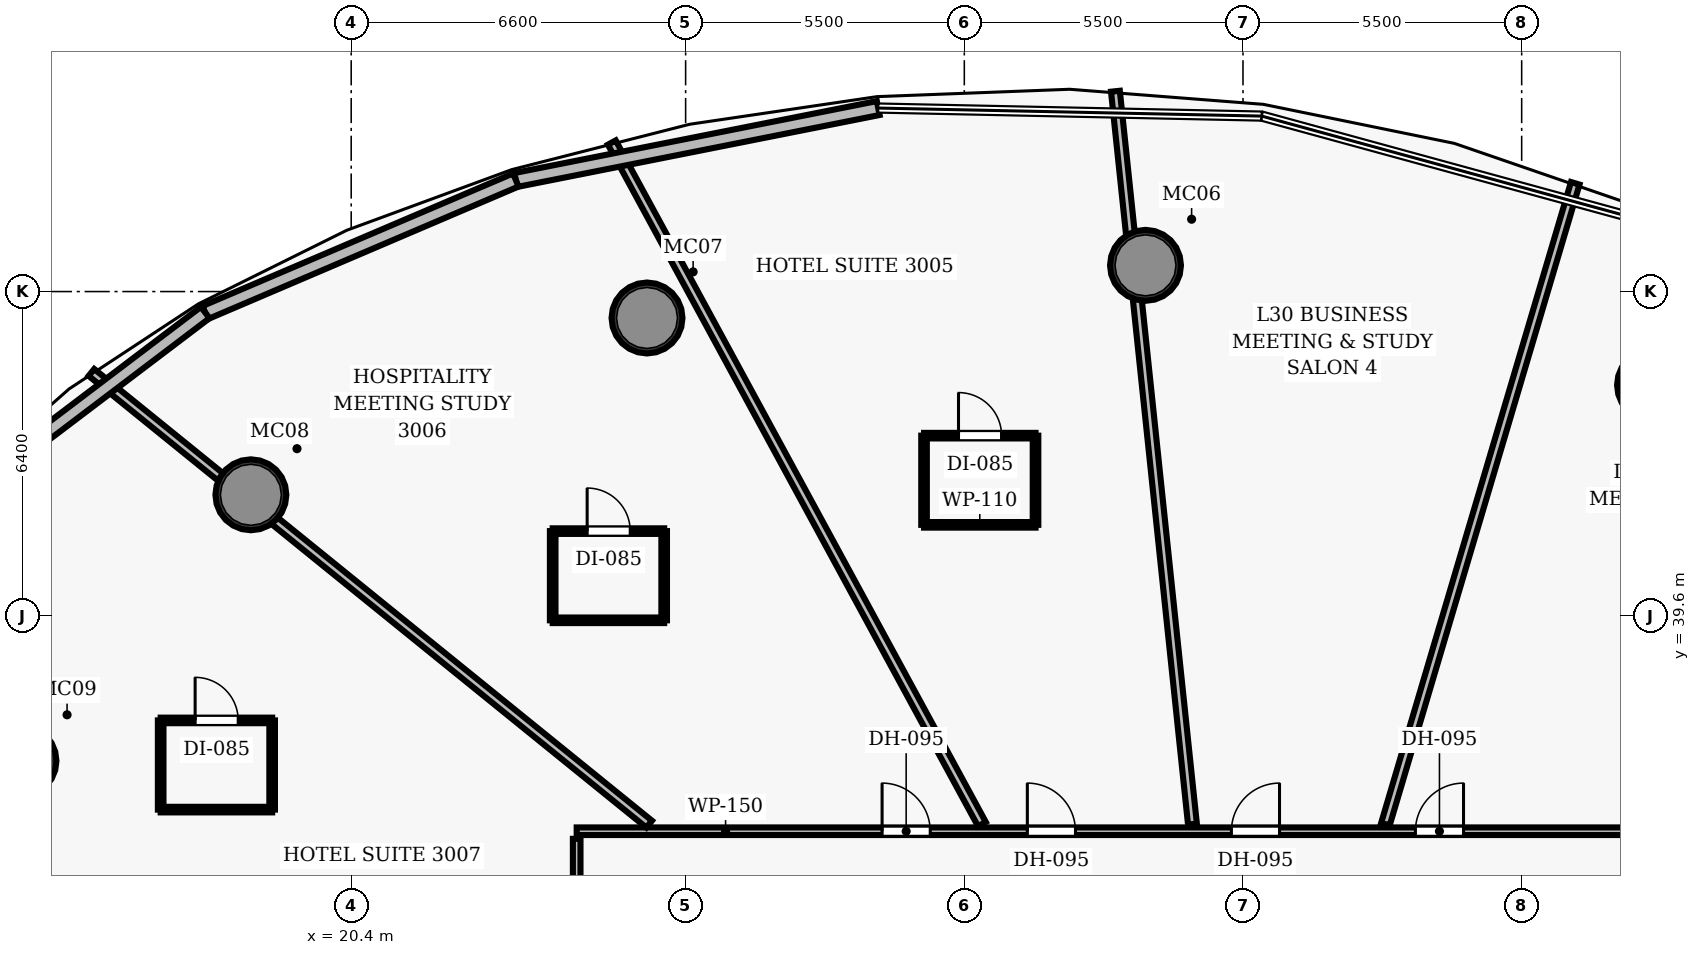
"""IFC4 building model, lengths in metres.
Left out: names, types, materials, properties, quantities, classifications, styles, units other than length and angle.
Written with IfcOpenShell. Run it as: python <this file> out.ifc"""

import sys

from ifc_helpers import new_model, si_unit, direction, frame, frame_2d, origin, origin_2d, place, context, subcontext, project, spatial, rectangle, hollow_circle, extrude, element, fill, save


model = new_model("IFC4")
c1 = context("Model", 3, precision=1e-05, world=origin(), true_north=direction((0.0, 1.0)))
c2 = subcontext(c1, "Body", "Model", "MODEL_VIEW")
j1 = project(units=[si_unit("LENGTHUNIT", "METRE"), si_unit("PLANEANGLEUNIT", "RADIAN")], contexts=[c1])
p1 = place(None, origin())
s1 = spatial("IfcSite", under=j1, at=p1, CompositionType="ELEMENT")
p2 = place(p1, origin())
s2 = spatial("IfcBuilding", under=s1, at=p2, CompositionType="ELEMENT")
p3 = place(p2, frame((0.0, 0.0, 123.8)))
s3 = spatial("IfcBuildingStorey", under=s2, at=p3, CompositionType="ELEMENT", Elevation=123.8)
for number, where, z_axis, x_axis in (
    (1, (46.083, 44.154, 0.0), (0.0, 0.0, 1.0), (1.0, 0.0, 0.0)),
    (2, (36.076, 46.517, 0.0), (0.0, 0.0, 1.0), (1.0, 0.0, 0.0)),
    (3, (26.238, 45.479, 0.0), (0.0, 0.0, 1.0), (1.0, 0.0, 0.0)),
    (4, (18.42, 41.989, 0.0), (0.0, 0.0, 1.0), (1.0, 0.0, 0.0)),
    (5, (13.882, 36.738, 0.0), (0.0, 0.0, 1.0), (1.0, 0.0, 0.0)),
):
    element("IfcColumn", number, at=place(p3, frame(where, z_axis=z_axis, x_axis=x_axis)), inside=s3, PredefinedType="COLUMN", context=c2, shape_type="SweptSolid", body=[
        extrude(hollow_circle(Radius=0.7, WallThickness=0.055, at=origin_2d()), origin(), (0.0, 0.0, 1.0), 3.5),
    ])
p4 = place(p3, frame((24.85, 35.35, 0.0), z_axis=(0.0, 0.0, 1.0), x_axis=(1.0, 0.0, 0.0)))
e6 = element("IfcWall", 6, at=p4, inside=s3, PredefinedType="PARTITIONING", context=c2, shape_type="SweptSolid", body=[
    extrude(rectangle(XDim=26.0, YDim=0.15, at=frame_2d((13.0, 0.0))), origin(), (0.0, 0.0, 1.0), 2.675),
])
p5 = place(p4, frame((21.964, 0.0, 0.0)))
e7 = element("IfcOpeningElement", 7, at=p5, cuts=e6, PredefinedType="OPENING", context=c2, shape_type="SweptSolid", body=[
    extrude(rectangle(XDim=0.95, YDim=2.15, at=frame_2d((0.475, 1.075))), frame((0.0, 0.085, 0.0), z_axis=(0.0, -1.0, 0.0), x_axis=(1.0, 0.0, 0.0)), (0.0, 0.0, 1.0), 0.17),
])
p6 = place(p4, frame((16.552, 0.0, 0.0)))
e8 = element("IfcOpeningElement", 8, at=p6, cuts=e6, PredefinedType="OPENING", context=c2, shape_type="SweptSolid", body=[
    extrude(rectangle(XDim=0.95, YDim=2.15, at=frame_2d((0.475, 1.075))), frame((0.0, 0.085, 0.0), z_axis=(0.0, -1.0, 0.0), x_axis=(1.0, 0.0, 0.0)), (0.0, 0.0, 1.0), 0.17),
])
p7 = place(p4, frame((12.921, 0.0, 0.0)))
e9 = element("IfcOpeningElement", 9, at=p7, cuts=e6, PredefinedType="OPENING", context=c2, shape_type="SweptSolid", body=[
    extrude(rectangle(XDim=0.95, YDim=2.15, at=frame_2d((0.475, 1.075))), frame((0.0, 0.085, 0.0), z_axis=(0.0, -1.0, 0.0), x_axis=(1.0, 0.0, 0.0)), (0.0, 0.0, 1.0), 0.17),
])
p8 = place(p4, frame((8.894, 0.0, 0.0)))
e10 = element("IfcOpeningElement", 10, at=p8, cuts=e6, PredefinedType="OPENING", context=c2, shape_type="SweptSolid", body=[
    extrude(rectangle(XDim=0.95, YDim=2.15, at=frame_2d((0.475, 1.075))), frame((0.0, 0.085, 0.0), z_axis=(0.0, -1.0, 0.0), x_axis=(1.0, 0.0, 0.0)), (0.0, 0.0, 1.0), 0.17),
])
p9 = place(p4, frame((6.027, 0.0, 0.0)))
e11 = element("IfcOpeningElement", 11, at=p9, cuts=e6, PredefinedType="OPENING", context=c2, shape_type="SweptSolid", body=[
    extrude(rectangle(XDim=0.95, YDim=2.15, at=frame_2d((0.475, 1.075))), frame((0.0, 0.085, 0.0), z_axis=(0.0, -1.0, 0.0), x_axis=(1.0, 0.0, 0.0)), (0.0, 0.0, 1.0), 0.17),
])
p10 = place(p3, frame((24.85, 27.08, 0.0), z_axis=(0.0, 0.0, 1.0), x_axis=(0.0, 1.0, 0.0)))
e12 = element("IfcWall", 12, at=p10, inside=s3, PredefinedType="PARTITIONING", context=c2, shape_type="SweptSolid", body=[
    extrude(rectangle(XDim=8.12, YDim=0.15, at=frame_2d((4.06, 0.0))), origin(), (0.0, 0.0, 1.0), 2.675),
])
p11 = place(p10, frame((4.027, 0.0, 0.0)))
e13 = element("IfcOpeningElement", 13, at=p11, cuts=e12, PredefinedType="OPENING", context=c2, shape_type="SweptSolid", body=[
    extrude(rectangle(XDim=0.95, YDim=2.15, at=frame_2d((0.475, 1.075))), frame((0.0, 0.085, 0.0), z_axis=(0.0, -1.0, 0.0), x_axis=(1.0, 0.0, 0.0)), (0.0, 0.0, 1.0), 0.17),
])
p12 = place(p3, frame((40.811, 35.49, 0.0), z_axis=(0.0, 0.0, 1.0), x_axis=(0.284012702831, 0.958820517423, 0.0)))
e14 = element("IfcWall", 14, at=p12, inside=s3, PredefinedType="PARTITIONING", context=c2, shape_type="SweptSolid", body=[
    extrude(rectangle(XDim=13.19, YDim=0.175, at=frame_2d((6.595, 0.0))), origin(), (0.0, 0.0, 1.0), 2.675),
])
p13 = place(p3, frame((37.003, 35.49, 0.0), z_axis=(0.0, 0.0, 1.0), x_axis=(-0.10453360694, 0.994521354733, 0.0)))
e15 = element("IfcWall", 15, at=p13, inside=s3, PredefinedType="PARTITIONING", context=c2, shape_type="SweptSolid", body=[
    extrude(rectangle(XDim=14.543, YDim=0.175, at=frame_2d((7.271, 0.0))), origin(), (0.0, 0.0, 1.0), 2.675),
])
p14 = place(p3, frame((32.847, 35.49, 0.0), z_axis=(0.0, 0.0, 1.0), x_axis=(-0.477169302066, 0.878811388846, 0.0)))
e16 = element("IfcWall", 16, at=p14, inside=s3, PredefinedType="PARTITIONING", context=c2, shape_type="SweptSolid", body=[
    extrude(rectangle(XDim=15.306, YDim=0.175, at=frame_2d((7.653, 0.0))), origin(), (0.0, 0.0, 1.0), 2.675),
])
p15 = place(p3, frame((26.281, 35.49, 0.0), z_axis=(0.0, 0.0, 1.0), x_axis=(-0.777136881542, 0.629331603646, 0.0)))
e17 = element("IfcWall", 17, at=p15, inside=s3, PredefinedType="PARTITIONING", context=c2, shape_type="SweptSolid", body=[
    extrude(rectangle(XDim=14.164, YDim=0.175, at=frame_2d((7.082, 0.0))), origin(), (0.0, 0.0, 1.0), 2.675),
])
p16 = place(p3, frame((24.71, 29.937, 0.0), z_axis=(0.0, 0.0, 1.0), x_axis=(-0.958822771046, 0.284005094539, 0.0)))
e18 = element("IfcWall", 18, at=p16, inside=s3, PredefinedType="PARTITIONING", context=c2, shape_type="SweptSolid", body=[
    extrude(rectangle(XDim=16.478, YDim=0.175, at=frame_2d((8.239, 0.0))), origin(), (0.0, 0.0, 1.0), 2.675),
])
p17 = place(p3, frame((31.705, 41.396, 0.0), z_axis=(0.0, 0.0, 1.0), x_axis=(1.0, 0.0, 0.0)))
e19 = element("IfcWall", 19, at=p17, inside=s3, PredefinedType="PARTITIONING", context=c2, shape_type="SweptSolid", body=[
    extrude(rectangle(XDim=2.2, YDim=0.11, at=frame_2d((1.1, 0.0))), origin(), (0.0, 0.0, 1.0), 2.675),
])
p18 = place(p3, frame((31.705, 43.156, 0.0), z_axis=(0.0, 0.0, 1.0), x_axis=(1.0, 0.0, 0.0)))
e20 = element("IfcWall", 20, at=p18, inside=s3, PredefinedType="PARTITIONING", context=c2, shape_type="SweptSolid", body=[
    extrude(rectangle(XDim=2.2, YDim=0.11, at=frame_2d((1.1, 0.0))), origin(), (0.0, 0.0, 1.0), 2.675),
])
p19 = place(p18, frame((0.68, 0.0, 0.0)))
e21 = element("IfcOpeningElement", 21, at=p19, cuts=e20, PredefinedType="OPENING", context=c2, shape_type="SweptSolid", body=[
    extrude(rectangle(XDim=0.85, YDim=2.1, at=frame_2d((0.425, 1.05))), frame((0.0, 0.065, 0.0), z_axis=(0.0, -1.0, 0.0), x_axis=(1.0, 0.0, 0.0)), (0.0, 0.0, 1.0), 0.13),
])
for number, where, z_axis, x_axis in (
    (22, (31.705, 41.396, 0.0), (0.0, 0.0, 1.0), (0.0, 1.0, 0.0)),
    (23, (33.906, 41.396, 0.0), (0.0, 0.0, 1.0), (0.0, 1.0, 0.0)),
):
    element("IfcWall", number, at=place(p3, frame(where, z_axis=z_axis, x_axis=x_axis)), inside=s3, PredefinedType="PARTITIONING", context=c2, shape_type="SweptSolid", body=[
        extrude(rectangle(XDim=1.76, YDim=0.11, at=frame_2d((0.88, 0.0))), origin(), (0.0, 0.0, 1.0), 2.675),
    ])
p20 = place(p3, frame((24.377, 39.513, 0.0), z_axis=(0.0, 0.0, 1.0), x_axis=(1.0, 0.0, 0.0)))
e24 = element("IfcWall", 24, at=p20, inside=s3, PredefinedType="PARTITIONING", context=c2, shape_type="SweptSolid", body=[
    extrude(rectangle(XDim=2.2, YDim=0.11, at=frame_2d((1.1, 0.0))), origin(), (0.0, 0.0, 1.0), 2.675),
])
p21 = place(p3, frame((24.377, 41.273, 0.0), z_axis=(0.0, 0.0, 1.0), x_axis=(1.0, 0.0, 0.0)))
e25 = element("IfcWall", 25, at=p21, inside=s3, PredefinedType="PARTITIONING", context=c2, shape_type="SweptSolid", body=[
    extrude(rectangle(XDim=2.2, YDim=0.11, at=frame_2d((1.1, 0.0))), origin(), (0.0, 0.0, 1.0), 2.675),
])
p22 = place(p21, frame((0.68, 0.0, 0.0)))
e26 = element("IfcOpeningElement", 26, at=p22, cuts=e25, PredefinedType="OPENING", context=c2, shape_type="SweptSolid", body=[
    extrude(rectangle(XDim=0.85, YDim=2.1, at=frame_2d((0.425, 1.05))), frame((0.0, 0.065, 0.0), z_axis=(0.0, -1.0, 0.0), x_axis=(1.0, 0.0, 0.0)), (0.0, 0.0, 1.0), 0.13),
])
for number, where, z_axis, x_axis in (
    (27, (24.377, 39.513, 0.0), (0.0, 0.0, 1.0), (0.0, 1.0, 0.0)),
    (28, (26.577, 39.513, 0.0), (0.0, 0.0, 1.0), (0.0, 1.0, 0.0)),
):
    element("IfcWall", number, at=place(p3, frame(where, z_axis=z_axis, x_axis=x_axis)), inside=s3, PredefinedType="PARTITIONING", context=c2, shape_type="SweptSolid", body=[
        extrude(rectangle(XDim=1.76, YDim=0.11, at=frame_2d((0.88, 0.0))), origin(), (0.0, 0.0, 1.0), 2.675),
    ])
p23 = place(p3, frame((16.64, 35.777, 0.0), z_axis=(0.0, 0.0, 1.0), x_axis=(1.0, 0.0, 0.0)))
e29 = element("IfcWall", 29, at=p23, inside=s3, PredefinedType="PARTITIONING", context=c2, shape_type="SweptSolid", body=[
    extrude(rectangle(XDim=2.2, YDim=0.11, at=frame_2d((1.1, 0.0))), origin(), (0.0, 0.0, 1.0), 2.675),
])
p24 = place(p3, frame((16.64, 37.537, 0.0), z_axis=(0.0, 0.0, 1.0), x_axis=(1.0, 0.0, 0.0)))
e30 = element("IfcWall", 30, at=p24, inside=s3, PredefinedType="PARTITIONING", context=c2, shape_type="SweptSolid", body=[
    extrude(rectangle(XDim=2.2, YDim=0.11, at=frame_2d((1.1, 0.0))), origin(), (0.0, 0.0, 1.0), 2.675),
])
p25 = place(p24, frame((0.68, 0.0, 0.0)))
e31 = element("IfcOpeningElement", 31, at=p25, cuts=e30, PredefinedType="OPENING", context=c2, shape_type="SweptSolid", body=[
    extrude(rectangle(XDim=0.85, YDim=2.1, at=frame_2d((0.425, 1.05))), frame((0.0, 0.065, 0.0), z_axis=(0.0, -1.0, 0.0), x_axis=(1.0, 0.0, 0.0)), (0.0, 0.0, 1.0), 0.13),
])
for number, where, z_axis, x_axis in (
    (32, (16.64, 35.777, 0.0), (0.0, 0.0, 1.0), (0.0, 1.0, 0.0)),
    (33, (18.84, 35.777, 0.0), (0.0, 0.0, 1.0), (0.0, 1.0, 0.0)),
):
    element("IfcWall", number, at=place(p3, frame(where, z_axis=z_axis, x_axis=x_axis)), inside=s3, PredefinedType="PARTITIONING", context=c2, shape_type="SweptSolid", body=[
        extrude(rectangle(XDim=1.76, YDim=0.11, at=frame_2d((0.88, 0.0))), origin(), (0.0, 0.0, 1.0), 2.675),
    ])
p26 = place(p3, frame((23.649, 48.202, 0.0), z_axis=(0.0, 0.0, 1.0), x_axis=(0.980871895122, 0.194654374108, 0.0)))
e34 = element("IfcWall", 34, at=p26, inside=s3, PredefinedType="SOLIDWALL", context=c2, shape_type="SweptSolid", body=[
    extrude(rectangle(XDim=7.292, YDim=0.28, at=frame_2d((3.646, 0.0))), origin(), (0.0, 0.0, 1.0), 3.26),
])
p27 = place(p3, frame((17.519, 45.586, 0.0), z_axis=(0.0, 0.0, 1.0), x_axis=(0.919735146148, 0.392539502395, 0.0)))
e35 = element("IfcWall", 35, at=p27, inside=s3, PredefinedType="SOLIDWALL", context=c2, shape_type="SweptSolid", body=[
    extrude(rectangle(XDim=6.665, YDim=0.28, at=frame_2d((3.333, 0.0))), origin(), (0.0, 0.0, 1.0), 3.26),
])
p28 = place(p3, frame((12.878, 42.069, 0.0), z_axis=(0.0, 0.0, 1.0), x_axis=(0.796971044297, 0.604017511792, 0.0)))
e36 = element("IfcWall", 36, at=p28, inside=s3, PredefinedType="SOLIDWALL", context=c2, shape_type="SweptSolid", body=[
    extrude(rectangle(XDim=5.823, YDim=0.28, at=frame_2d((2.911, 0.0))), origin(), (0.0, 0.0, 1.0), 3.26),
])
p29 = place(p6, origin())
e37 = element("IfcDoor", 37, at=p29, inside=s3, OperationType="SINGLE_SWING_RIGHT", PredefinedType="DOOR", context=c2, shape_type="SweptSolid", body=[
    extrude(rectangle(XDim=0.95, YDim=2.15, at=frame_2d((0.475, 1.075))), frame((0.0, 0.025, 0.0), z_axis=(0.0, -1.0, 0.0), x_axis=(1.0, 0.0, 0.0)), (0.0, 0.0, 1.0), 0.05),
])
fill(e8, e37)
p30 = place(p7, origin())
e38 = element("IfcDoor", 38, at=p30, inside=s3, OperationType="SINGLE_SWING_RIGHT", PredefinedType="DOOR", context=c2, shape_type="SweptSolid", body=[
    extrude(rectangle(XDim=0.95, YDim=2.15, at=frame_2d((0.475, 1.075))), frame((0.0, 0.025, 0.0), z_axis=(0.0, -1.0, 0.0), x_axis=(1.0, 0.0, 0.0)), (0.0, 0.0, 1.0), 0.05),
])
fill(e9, e38)
p31 = place(p8, origin())
e39 = element("IfcDoor", 39, at=p31, inside=s3, OperationType="SINGLE_SWING_LEFT", PredefinedType="DOOR", context=c2, shape_type="SweptSolid", body=[
    extrude(rectangle(XDim=0.95, YDim=2.15, at=frame_2d((0.475, 1.075))), frame((0.0, 0.025, 0.0), z_axis=(0.0, -1.0, 0.0), x_axis=(1.0, 0.0, 0.0)), (0.0, 0.0, 1.0), 0.05),
])
fill(e10, e39)
p32 = place(p19, origin())
e40 = element("IfcDoor", 40, at=p32, inside=s3, OperationType="SINGLE_SWING_LEFT", PredefinedType="DOOR", context=c2, shape_type="SweptSolid", body=[
    extrude(rectangle(XDim=0.85, YDim=2.1, at=frame_2d((0.425, 1.05))), frame((0.0, 0.025, 0.0), z_axis=(0.0, -1.0, 0.0), x_axis=(1.0, 0.0, 0.0)), (0.0, 0.0, 1.0), 0.05),
])
fill(e21, e40)
p33 = place(p9, origin())
e41 = element("IfcDoor", 41, at=p33, inside=s3, OperationType="SINGLE_SWING_LEFT", PredefinedType="DOOR", context=c2, shape_type="SweptSolid", body=[
    extrude(rectangle(XDim=0.95, YDim=2.15, at=frame_2d((0.475, 1.075))), frame((0.0, 0.025, 0.0), z_axis=(0.0, -1.0, 0.0), x_axis=(1.0, 0.0, 0.0)), (0.0, 0.0, 1.0), 0.05),
])
fill(e11, e41)
p34 = place(p22, origin())
e42 = element("IfcDoor", 42, at=p34, inside=s3, OperationType="SINGLE_SWING_LEFT", PredefinedType="DOOR", context=c2, shape_type="SweptSolid", body=[
    extrude(rectangle(XDim=0.85, YDim=2.1, at=frame_2d((0.425, 1.05))), frame((0.0, 0.025, 0.0), z_axis=(0.0, -1.0, 0.0), x_axis=(1.0, 0.0, 0.0)), (0.0, 0.0, 1.0), 0.05),
])
fill(e26, e42)
p35 = place(p25, origin())
e43 = element("IfcDoor", 43, at=p35, inside=s3, OperationType="SINGLE_SWING_LEFT", PredefinedType="DOOR", context=c2, shape_type="SweptSolid", body=[
    extrude(rectangle(XDim=0.85, YDim=2.1, at=frame_2d((0.425, 1.05))), frame((0.0, 0.025, 0.0), z_axis=(0.0, -1.0, 0.0), x_axis=(1.0, 0.0, 0.0)), (0.0, 0.0, 1.0), 0.05),
])
fill(e31, e43)
save(model, sys.argv[1])
